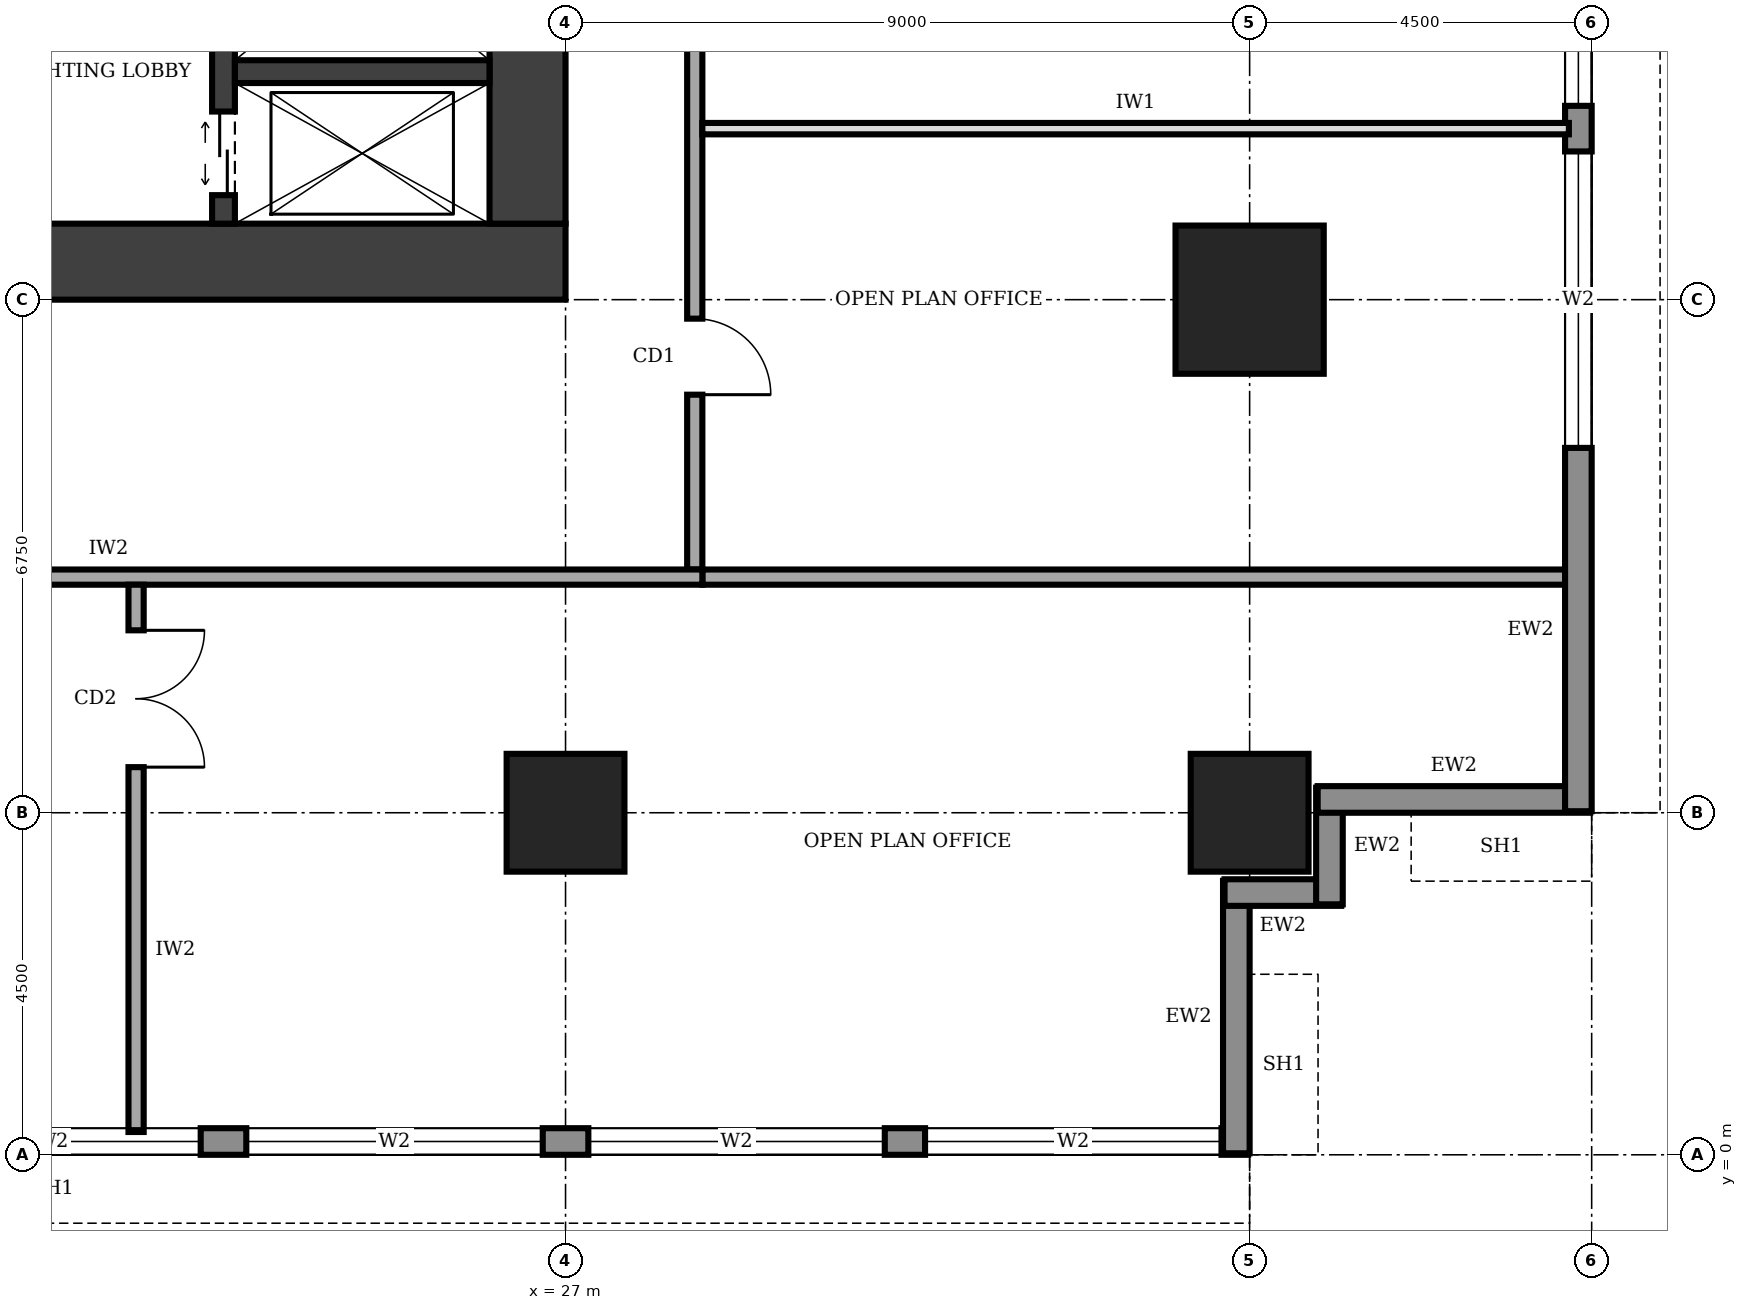
"""IFC4 building model, lengths in metres.
Left out: names, types, materials, properties, quantities, classifications, styles, units other than length and angle.
Written with IfcOpenShell. Run it as: python <this file> out.ifc"""

import sys

from ifc_helpers import new_model, si_unit, direction, frame, frame_2d, origin, origin_2d, place, context, subcontext, project, spatial, rectangle, extrude, element, fill, save


model = new_model("IFC4")
c1 = context("Model", 3, precision=1e-05, world=origin(), true_north=direction((0.0, 1.0)))
c2 = subcontext(c1, "Body", "Model", "MODEL_VIEW")
j1 = project(units=[si_unit("LENGTHUNIT", "METRE"), si_unit("PLANEANGLEUNIT", "RADIAN")], contexts=[c1])
p1 = place(None, origin())
s1 = spatial("IfcSite", under=j1, at=p1, CompositionType="ELEMENT")
p2 = place(p1, origin())
s2 = spatial("IfcBuilding", under=s1, at=p2, CompositionType="ELEMENT")
p3 = place(p2, frame((0.0, 0.0, 241.0)))
s3 = spatial("IfcBuildingStorey", under=s2, at=p3, CompositionType="ELEMENT", Elevation=241.0)
p4 = place(p3, frame((13.5, 11.75, 0.0), z_axis=(0.0, 0.0, 1.0), x_axis=(1.0, 0.0, 0.0)))
e1 = element("IfcWall", 1, at=p4, inside=s3, PredefinedType="SHEAR", context=c2, shape_type="SweptSolid", body=[
    extrude(rectangle(XDim=13.5, YDim=1.0, at=frame_2d((6.75, 0.0))), origin(), (0.0, 0.0, 1.0), 4.0),
])
p5 = place(p4, frame((4.75, 0.0, 0.0)))
e2 = element("IfcOpeningElement", 2, at=p5, cuts=e1, PredefinedType="OPENING", context=c2, shape_type="SweptSolid", body=[
    extrude(rectangle(XDim=1.0, YDim=2.1, at=frame_2d((0.5, 1.05))), frame((0.0, 0.51, 0.0), z_axis=(0.0, -1.0, 0.0), x_axis=(1.0, 0.0, 0.0)), (0.0, 0.0, 1.0), 1.02),
])
p6 = place(p3, frame((26.5, 12.25, 0.0), z_axis=(0.0, 0.0, 1.0), x_axis=(0.0, 1.0, 0.0)))
e3 = element("IfcWall", 3, at=p6, inside=s3, PredefinedType="SHEAR", context=c2, shape_type="SweptSolid", body=[
    extrude(rectangle(XDim=16.0, YDim=1.0, at=frame_2d((8.0, 0.0))), origin(), (0.0, 0.0, 1.0), 4.0),
])
p7 = place(p3, frame((22.5, 12.25, 0.0), z_axis=(0.0, 0.0, 1.0), x_axis=(0.0, 1.0, 0.0)))
e4 = element("IfcWall", 4, at=p7, inside=s3, PredefinedType="SHEAR", context=c2, shape_type="SweptSolid", body=[
    extrude(rectangle(XDim=16.0, YDim=0.3, at=frame_2d((8.0, 0.0))), origin(), (0.0, 0.0, 1.0), 4.0),
])
p8 = place(p7, frame((14.6, 0.0, 0.0)))
e5 = element("IfcOpeningElement", 5, at=p8, cuts=e4, PredefinedType="OPENING", context=c2, shape_type="SweptSolid", body=[
    extrude(rectangle(XDim=1.0, YDim=2.1, at=frame_2d((0.5, 1.05))), frame((0.0, 0.16, 0.0), z_axis=(0.0, -1.0, 0.0), x_axis=(1.0, 0.0, 0.0)), (0.0, 0.0, 1.0), 0.32),
])
p9 = place(p7, frame((0.375, 0.0, 0.0)))
e6 = element("IfcOpeningElement", 6, at=p9, cuts=e4, PredefinedType="OPENING", context=c2, shape_type="SweptSolid", body=[
    extrude(rectangle(XDim=1.1, YDim=2.1, at=frame_2d((0.55, 1.05))), frame((0.0, 0.16, 0.0), z_axis=(0.0, -1.0, 0.0), x_axis=(1.0, 0.0, 0.0)), (0.0, 0.0, 1.0), 0.32),
])
p10 = place(p7, frame((3.7, 0.0, 0.0)))
e7 = element("IfcOpeningElement", 7, at=p10, cuts=e4, PredefinedType="OPENING", context=c2, shape_type="SweptSolid", body=[
    extrude(rectangle(XDim=1.1, YDim=2.1, at=frame_2d((0.55, 1.05))), frame((0.0, 0.16, 0.0), z_axis=(0.0, -1.0, 0.0), x_axis=(1.0, 0.0, 0.0)), (0.0, 0.0, 1.0), 0.32),
])
p11 = place(p7, frame((5.95, 0.0, 0.0)))
e8 = element("IfcOpeningElement", 8, at=p11, cuts=e4, PredefinedType="OPENING", context=c2, shape_type="SweptSolid", body=[
    extrude(rectangle(XDim=1.1, YDim=2.1, at=frame_2d((0.55, 1.05))), frame((0.0, 0.16, 0.0), z_axis=(0.0, -1.0, 0.0), x_axis=(1.0, 0.0, 0.0)), (0.0, 0.0, 1.0), 0.32),
])
p12 = place(p3, frame((22.65, 14.25, 0.0), z_axis=(0.0, 0.0, 1.0), x_axis=(1.0, 0.0, 0.0)))
e9 = element("IfcWall", 9, at=p12, inside=s3, PredefinedType="SHEAR", context=c2, shape_type="SweptSolid", body=[
    extrude(rectangle(XDim=3.35, YDim=0.3, at=frame_2d((1.675, 0.0))), origin(), (0.0, 0.0, 1.0), 4.0),
])
for number, where, z_axis, x_axis in (
    (10, (27.0, 4.5, 0.0), (0.0, 0.0, 1.0), (1.0, 0.0, 0.0)),
    (11, (36.0, 4.5, 0.0), (0.0, 0.0, 1.0), (1.0, 0.0, 0.0)),
):
    element("IfcColumn", number, at=place(p3, frame(where, z_axis=z_axis, x_axis=x_axis)), inside=s3, PredefinedType="COLUMN", context=c2, shape_type="SweptSolid", body=[
        extrude(rectangle(XDim=1.55, YDim=1.55, at=origin_2d()), origin(), (0.0, 0.0, 1.0), 4.0),
    ])
p13 = place(p3, frame((36.0, 11.25, 0.0), z_axis=(0.0, 0.0, 1.0), x_axis=(1.0, 0.0, 0.0)))
e12 = element("IfcColumn", 12, at=p13, inside=s3, PredefinedType="COLUMN", context=c2, shape_type="SweptSolid", body=[
    extrude(rectangle(XDim=1.95, YDim=1.95, at=origin_2d()), origin(), (0.0, 0.0, 1.0), 4.0),
])
p14 = place(p3, frame((4.52, 0.175, 0.0), z_axis=(0.0, 0.0, 1.0), x_axis=(1.0, 0.0, 0.0)))
e13 = element("IfcWall", 13, at=p14, inside=s3, PredefinedType="STANDARD", context=c2, shape_type="SweptSolid", body=[
    extrude(rectangle(XDim=31.46, YDim=0.35, at=frame_2d((15.73, 0.0))), origin(), (0.0, 0.0, 1.0), 3.75),
])
p15 = place(p14, frame((4.78, 0.0, 0.6)))
e14 = element("IfcOpeningElement", 14, at=p15, cuts=e13, PredefinedType="OPENING", context=c2, shape_type="SweptSolid", body=[
    extrude(rectangle(XDim=3.9, YDim=2.6, at=frame_2d((1.95, 1.3))), frame((0.0, 0.185, 0.0), z_axis=(0.0, -1.0, 0.0), x_axis=(1.0, 0.0, 0.0)), (0.0, 0.0, 1.0), 0.37),
])
p16 = place(p14, frame((9.28, 0.0, 0.6)))
e15 = element("IfcOpeningElement", 15, at=p16, cuts=e13, PredefinedType="OPENING", context=c2, shape_type="SweptSolid", body=[
    extrude(rectangle(XDim=3.9, YDim=2.6, at=frame_2d((1.95, 1.3))), frame((0.0, 0.185, 0.0), z_axis=(0.0, -1.0, 0.0), x_axis=(1.0, 0.0, 0.0)), (0.0, 0.0, 1.0), 0.37),
])
p17 = place(p14, frame((13.78, 0.0, 0.6)))
e16 = element("IfcOpeningElement", 16, at=p17, cuts=e13, PredefinedType="OPENING", context=c2, shape_type="SweptSolid", body=[
    extrude(rectangle(XDim=3.9, YDim=2.6, at=frame_2d((1.95, 1.3))), frame((0.0, 0.185, 0.0), z_axis=(0.0, -1.0, 0.0), x_axis=(1.0, 0.0, 0.0)), (0.0, 0.0, 1.0), 0.37),
])
p18 = place(p14, frame((18.28, 0.0, 0.6)))
e17 = element("IfcOpeningElement", 17, at=p18, cuts=e13, PredefinedType="OPENING", context=c2, shape_type="SweptSolid", body=[
    extrude(rectangle(XDim=3.9, YDim=2.6, at=frame_2d((1.95, 1.3))), frame((0.0, 0.185, 0.0), z_axis=(0.0, -1.0, 0.0), x_axis=(1.0, 0.0, 0.0)), (0.0, 0.0, 1.0), 0.37),
])
p19 = place(p14, frame((22.78, 0.0, 0.6)))
e18 = element("IfcOpeningElement", 18, at=p19, cuts=e13, PredefinedType="OPENING", context=c2, shape_type="SweptSolid", body=[
    extrude(rectangle(XDim=3.9, YDim=2.6, at=frame_2d((1.95, 1.3))), frame((0.0, 0.185, 0.0), z_axis=(0.0, -1.0, 0.0), x_axis=(1.0, 0.0, 0.0)), (0.0, 0.0, 1.0), 0.37),
])
p20 = place(p14, frame((27.21, 0.0, 0.6)))
e19 = element("IfcOpeningElement", 19, at=p20, cuts=e13, PredefinedType="OPENING", context=c2, shape_type="SweptSolid", body=[
    extrude(rectangle(XDim=3.9, YDim=2.6, at=frame_2d((1.95, 1.3))), frame((0.0, 0.185, 0.0), z_axis=(0.0, -1.0, 0.0), x_axis=(1.0, 0.0, 0.0)), (0.0, 0.0, 1.0), 0.37),
])
p21 = place(p3, frame((35.825, 0.02, 0.0), z_axis=(0.0, 0.0, 1.0), x_axis=(0.0, 1.0, 0.0)))
e20 = element("IfcWall", 20, at=p21, inside=s3, PredefinedType="STANDARD", context=c2, shape_type="SweptSolid", body=[
    extrude(rectangle(XDim=3.585, YDim=0.35, at=frame_2d((1.792, 0.0))), origin(), (0.0, 0.0, 1.0), 2.75),
])
for number, where, z_axis, x_axis in (
    (21, (35.67, 3.45, 0.0), (0.0, 0.0, 1.0), (1.0, 0.0, 0.0)),
    (22, (37.05, 3.295, 0.0), (0.0, 0.0, 1.0), (0.0, 1.0, 0.0)),
):
    element("IfcWall", number, at=place(p3, frame(where, z_axis=z_axis, x_axis=x_axis)), inside=s3, PredefinedType="STANDARD", context=c2, shape_type="SweptSolid", body=[
        extrude(rectangle(XDim=1.535, YDim=0.35, at=frame_2d((0.768, 0.0))), origin(), (0.0, 0.0, 1.0), 3.75),
    ])
p22 = place(p3, frame((36.895, 4.675, 0.0), z_axis=(0.0, 0.0, 1.0), x_axis=(1.0, 0.0, 0.0)))
e23 = element("IfcWall", 23, at=p22, inside=s3, PredefinedType="STANDARD", context=c2, shape_type="SweptSolid", body=[
    extrude(rectangle(XDim=3.585, YDim=0.35, at=frame_2d((1.792, 0.0))), origin(), (0.0, 0.0, 1.0), 2.75),
])
p23 = place(p3, frame((40.325, 4.52, 0.0), z_axis=(0.0, 0.0, 1.0), x_axis=(0.0, 1.0, 0.0)))
e24 = element("IfcWall", 24, at=p23, inside=s3, PredefinedType="STANDARD", context=c2, shape_type="SweptSolid", body=[
    extrude(rectangle(XDim=31.46, YDim=0.35, at=frame_2d((15.73, 0.0))), origin(), (0.0, 0.0, 1.0), 3.75),
])
p24 = place(p23, frame((4.78, 0.0, 0.6)))
e25 = element("IfcOpeningElement", 25, at=p24, cuts=e24, PredefinedType="OPENING", context=c2, shape_type="SweptSolid", body=[
    extrude(rectangle(XDim=3.9, YDim=2.6, at=frame_2d((1.95, 1.3))), frame((0.0, 0.185, 0.0), z_axis=(0.0, -1.0, 0.0), x_axis=(1.0, 0.0, 0.0)), (0.0, 0.0, 1.0), 0.37),
])
p25 = place(p23, frame((9.28, 0.0, 0.6)))
e26 = element("IfcOpeningElement", 26, at=p25, cuts=e24, PredefinedType="OPENING", context=c2, shape_type="SweptSolid", body=[
    extrude(rectangle(XDim=3.9, YDim=2.6, at=frame_2d((1.95, 1.3))), frame((0.0, 0.185, 0.0), z_axis=(0.0, -1.0, 0.0), x_axis=(1.0, 0.0, 0.0)), (0.0, 0.0, 1.0), 0.37),
])
p26 = place(p23, frame((13.78, 0.0, 0.6)))
e27 = element("IfcOpeningElement", 27, at=p26, cuts=e24, PredefinedType="OPENING", context=c2, shape_type="SweptSolid", body=[
    extrude(rectangle(XDim=3.9, YDim=2.6, at=frame_2d((1.95, 1.3))), frame((0.0, 0.185, 0.0), z_axis=(0.0, -1.0, 0.0), x_axis=(1.0, 0.0, 0.0)), (0.0, 0.0, 1.0), 0.37),
])
p27 = place(p23, frame((18.28, 0.0, 0.6)))
e28 = element("IfcOpeningElement", 28, at=p27, cuts=e24, PredefinedType="OPENING", context=c2, shape_type="SweptSolid", body=[
    extrude(rectangle(XDim=3.9, YDim=2.6, at=frame_2d((1.95, 1.3))), frame((0.0, 0.185, 0.0), z_axis=(0.0, -1.0, 0.0), x_axis=(1.0, 0.0, 0.0)), (0.0, 0.0, 1.0), 0.37),
])
p28 = place(p23, frame((22.78, 0.0, 0.6)))
e29 = element("IfcOpeningElement", 29, at=p28, cuts=e24, PredefinedType="OPENING", context=c2, shape_type="SweptSolid", body=[
    extrude(rectangle(XDim=3.9, YDim=2.6, at=frame_2d((1.95, 1.3))), frame((0.0, 0.185, 0.0), z_axis=(0.0, -1.0, 0.0), x_axis=(1.0, 0.0, 0.0)), (0.0, 0.0, 1.0), 0.37),
])
p29 = place(p23, frame((27.21, 0.0, 0.6)))
e30 = element("IfcOpeningElement", 30, at=p29, cuts=e24, PredefinedType="OPENING", context=c2, shape_type="SweptSolid", body=[
    extrude(rectangle(XDim=3.9, YDim=2.6, at=frame_2d((1.95, 1.3))), frame((0.0, 0.185, 0.0), z_axis=(0.0, -1.0, 0.0), x_axis=(1.0, 0.0, 0.0)), (0.0, 0.0, 1.0), 0.37),
])
p30 = place(p3, frame((11.9, 7.6, 0.0), z_axis=(0.0, 0.0, 1.0), x_axis=(1.0, 0.0, 0.0)))
e31 = element("IfcWall", 31, at=p30, inside=s3, PredefinedType="SOLIDWALL", context=c2, shape_type="SweptSolid", body=[
    extrude(rectangle(XDim=16.9, YDim=0.2, at=frame_2d((8.45, 0.0))), origin(), (0.0, 0.0, 1.0), 3.75),
])
p31 = place(p30, frame((0.275, 0.0, 0.0)))
e32 = element("IfcOpeningElement", 32, at=p31, cuts=e31, PredefinedType="OPENING", context=c2, shape_type="SweptSolid", body=[
    extrude(rectangle(XDim=1.0, YDim=2.1, at=frame_2d((0.5, 1.05))), frame((0.0, 0.11, 0.0), z_axis=(0.0, -1.0, 0.0), x_axis=(1.0, 0.0, 0.0)), (0.0, 0.0, 1.0), 0.22),
])
p32 = place(p3, frame((28.7, 7.7, 0.0), z_axis=(0.0, 0.0, 1.0), x_axis=(0.0, 1.0, 0.0)))
e33 = element("IfcWall", 33, at=p32, inside=s3, PredefinedType="SOLIDWALL", context=c2, shape_type="SweptSolid", body=[
    extrude(rectangle(XDim=25.3, YDim=0.2, at=frame_2d((12.65, 0.0))), origin(), (0.0, 0.0, 1.0), 3.75),
])
p33 = place(p32, frame((2.3, 0.0, 0.0)))
e34 = element("IfcOpeningElement", 34, at=p33, cuts=e33, PredefinedType="OPENING", context=c2, shape_type="SweptSolid", body=[
    extrude(rectangle(XDim=1.0, YDim=2.1, at=frame_2d((0.5, 1.05))), frame((0.0, 0.11, 0.0), z_axis=(0.0, -1.0, 0.0), x_axis=(1.0, 0.0, 0.0)), (0.0, 0.0, 1.0), 0.22),
])
p34 = place(p32, frame((7.55, 0.0, 0.0)))
e35 = element("IfcOpeningElement", 35, at=p34, cuts=e33, PredefinedType="OPENING", context=c2, shape_type="SweptSolid", body=[
    extrude(rectangle(XDim=1.0, YDim=2.1, at=frame_2d((0.5, 1.05))), frame((0.0, 0.11, 0.0), z_axis=(0.0, -1.0, 0.0), x_axis=(1.0, 0.0, 0.0)), (0.0, 0.0, 1.0), 0.22),
])
p35 = place(p32, frame((16.9, 0.0, 0.0)))
e36 = element("IfcOpeningElement", 36, at=p35, cuts=e33, PredefinedType="OPENING", context=c2, shape_type="SweptSolid", body=[
    extrude(rectangle(XDim=1.8, YDim=2.1, at=frame_2d((0.9, 1.05))), frame((0.0, 0.11, 0.0), z_axis=(0.0, -1.0, 0.0), x_axis=(1.0, 0.0, 0.0)), (0.0, 0.0, 1.0), 0.22),
])
p36 = place(p3, frame((21.35, 7.5, 0.0), z_axis=(0.0, 0.0, 1.0), x_axis=(0.0, -1.0, 0.0)))
e37 = element("IfcWall", 37, at=p36, inside=s3, PredefinedType="SOLIDWALL", context=c2, shape_type="SweptSolid", body=[
    extrude(rectangle(XDim=7.2, YDim=0.2, at=frame_2d((3.6, 0.0))), origin(), (0.0, 0.0, 1.0), 3.75),
])
p37 = place(p36, frame((0.6, 0.0, 0.0)))
e38 = element("IfcOpeningElement", 38, at=p37, cuts=e37, PredefinedType="OPENING", context=c2, shape_type="SweptSolid", body=[
    extrude(rectangle(XDim=1.8, YDim=2.1, at=frame_2d((0.9, 1.05))), frame((0.0, 0.11, 0.0), z_axis=(0.0, -1.0, 0.0), x_axis=(1.0, 0.0, 0.0)), (0.0, 0.0, 1.0), 0.22),
])
p38 = place(p3, frame((28.8, 7.6, 0.0), z_axis=(0.0, 0.0, 1.0), x_axis=(1.0, 0.0, 0.0)))
e39 = element("IfcWall", 39, at=p38, inside=s3, PredefinedType="SOLIDWALL", context=c2, shape_type="SweptSolid", body=[
    extrude(rectangle(XDim=11.4, YDim=0.2, at=frame_2d((5.7, 0.0))), origin(), (0.0, 0.0, 1.0), 3.75),
])
p39 = place(p3, frame((28.8, 13.5, 0.0), z_axis=(0.0, 0.0, 1.0), x_axis=(1.0, 0.0, 0.0)))
e40 = element("IfcWall", 40, at=p39, inside=s3, PredefinedType="PARTITIONING", context=c2, shape_type="SweptSolid", body=[
    extrude(rectangle(XDim=11.4, YDim=0.15, at=frame_2d((5.7, 0.0))), origin(), (0.0, 0.0, 1.0), 3.75),
])
p40 = place(p17, origin())
e41 = element("IfcWindow", 41, at=p40, inside=s3, PartitioningType="SINGLE_PANEL", PredefinedType="WINDOW", context=c2, shape_type="SweptSolid", body=[
    extrude(rectangle(XDim=3.9, YDim=2.6, at=frame_2d((1.95, 1.3))), frame((0.0, 0.03, 0.0), z_axis=(0.0, -1.0, 0.0), x_axis=(1.0, 0.0, 0.0)), (0.0, 0.0, 1.0), 0.06),
])
fill(e16, e41)
p41 = place(p18, origin())
e42 = element("IfcWindow", 42, at=p41, inside=s3, PartitioningType="SINGLE_PANEL", PredefinedType="WINDOW", context=c2, shape_type="SweptSolid", body=[
    extrude(rectangle(XDim=3.9, YDim=2.6, at=frame_2d((1.95, 1.3))), frame((0.0, 0.03, 0.0), z_axis=(0.0, -1.0, 0.0), x_axis=(1.0, 0.0, 0.0)), (0.0, 0.0, 1.0), 0.06),
])
fill(e17, e42)
p42 = place(p19, origin())
e43 = element("IfcWindow", 43, at=p42, inside=s3, PartitioningType="SINGLE_PANEL", PredefinedType="WINDOW", context=c2, shape_type="SweptSolid", body=[
    extrude(rectangle(XDim=3.9, YDim=2.6, at=frame_2d((1.95, 1.3))), frame((0.0, 0.03, 0.0), z_axis=(0.0, -1.0, 0.0), x_axis=(1.0, 0.0, 0.0)), (0.0, 0.0, 1.0), 0.06),
])
fill(e18, e43)
p43 = place(p20, origin())
e44 = element("IfcWindow", 44, at=p43, inside=s3, PartitioningType="SINGLE_PANEL", PredefinedType="WINDOW", context=c2, shape_type="SweptSolid", body=[
    extrude(rectangle(XDim=3.9, YDim=2.6, at=frame_2d((1.95, 1.3))), frame((0.0, 0.03, 0.0), z_axis=(0.0, -1.0, 0.0), x_axis=(1.0, 0.0, 0.0)), (0.0, 0.0, 1.0), 0.06),
])
fill(e19, e44)
p44 = place(p24, origin())
e45 = element("IfcWindow", 45, at=p44, inside=s3, PartitioningType="SINGLE_PANEL", PredefinedType="WINDOW", context=c2, shape_type="SweptSolid", body=[
    extrude(rectangle(XDim=3.9, YDim=2.6, at=frame_2d((1.95, 1.3))), frame((0.0, 0.03, 0.0), z_axis=(0.0, -1.0, 0.0), x_axis=(1.0, 0.0, 0.0)), (0.0, 0.0, 1.0), 0.06),
])
fill(e25, e45)
p45 = place(p25, origin())
e46 = element("IfcWindow", 46, at=p45, inside=s3, PartitioningType="SINGLE_PANEL", PredefinedType="WINDOW", context=c2, shape_type="SweptSolid", body=[
    extrude(rectangle(XDim=3.9, YDim=2.6, at=frame_2d((1.95, 1.3))), frame((0.0, 0.03, 0.0), z_axis=(0.0, -1.0, 0.0), x_axis=(1.0, 0.0, 0.0)), (0.0, 0.0, 1.0), 0.06),
])
fill(e26, e46)
p46 = place(p9, origin())
e47 = element("IfcDoor", 47, at=p46, inside=s3, OperationType="DOUBLE_DOOR_SLIDING", PredefinedType="DOOR", context=c2, shape_type="SweptSolid", body=[
    extrude(rectangle(XDim=1.1, YDim=2.1, at=frame_2d((0.55, 1.05))), frame((0.0, 0.025, 0.0), z_axis=(0.0, -1.0, 0.0), x_axis=(1.0, 0.0, 0.0)), (0.0, 0.0, 1.0), 0.05),
])
fill(e6, e47)
p47 = place(p33, frame((1.0, 0.0, 0.0), z_axis=(0.0, 0.0, 1.0), x_axis=(-1.0, 0.0, 0.0)))
e48 = element("IfcDoor", 48, at=p47, inside=s3, OperationType="SINGLE_SWING_RIGHT", PredefinedType="DOOR", context=c2, shape_type="SweptSolid", body=[
    extrude(rectangle(XDim=1.0, YDim=2.1, at=frame_2d((0.5, 1.05))), frame((0.0, 0.025, 0.0), z_axis=(0.0, -1.0, 0.0), x_axis=(1.0, 0.0, 0.0)), (0.0, 0.0, 1.0), 0.05),
])
fill(e34, e48)
p48 = place(p37, origin())
e49 = element("IfcDoor", 49, at=p48, inside=s3, OperationType="DOUBLE_DOOR_SINGLE_SWING", PredefinedType="DOOR", context=c2, shape_type="SweptSolid", body=[
    extrude(rectangle(XDim=1.8, YDim=2.1, at=frame_2d((0.9, 1.05))), frame((0.0, 0.025, 0.0), z_axis=(0.0, -1.0, 0.0), x_axis=(1.0, 0.0, 0.0)), (0.0, 0.0, 1.0), 0.05),
])
fill(e38, e49)
save(model, sys.argv[1])
